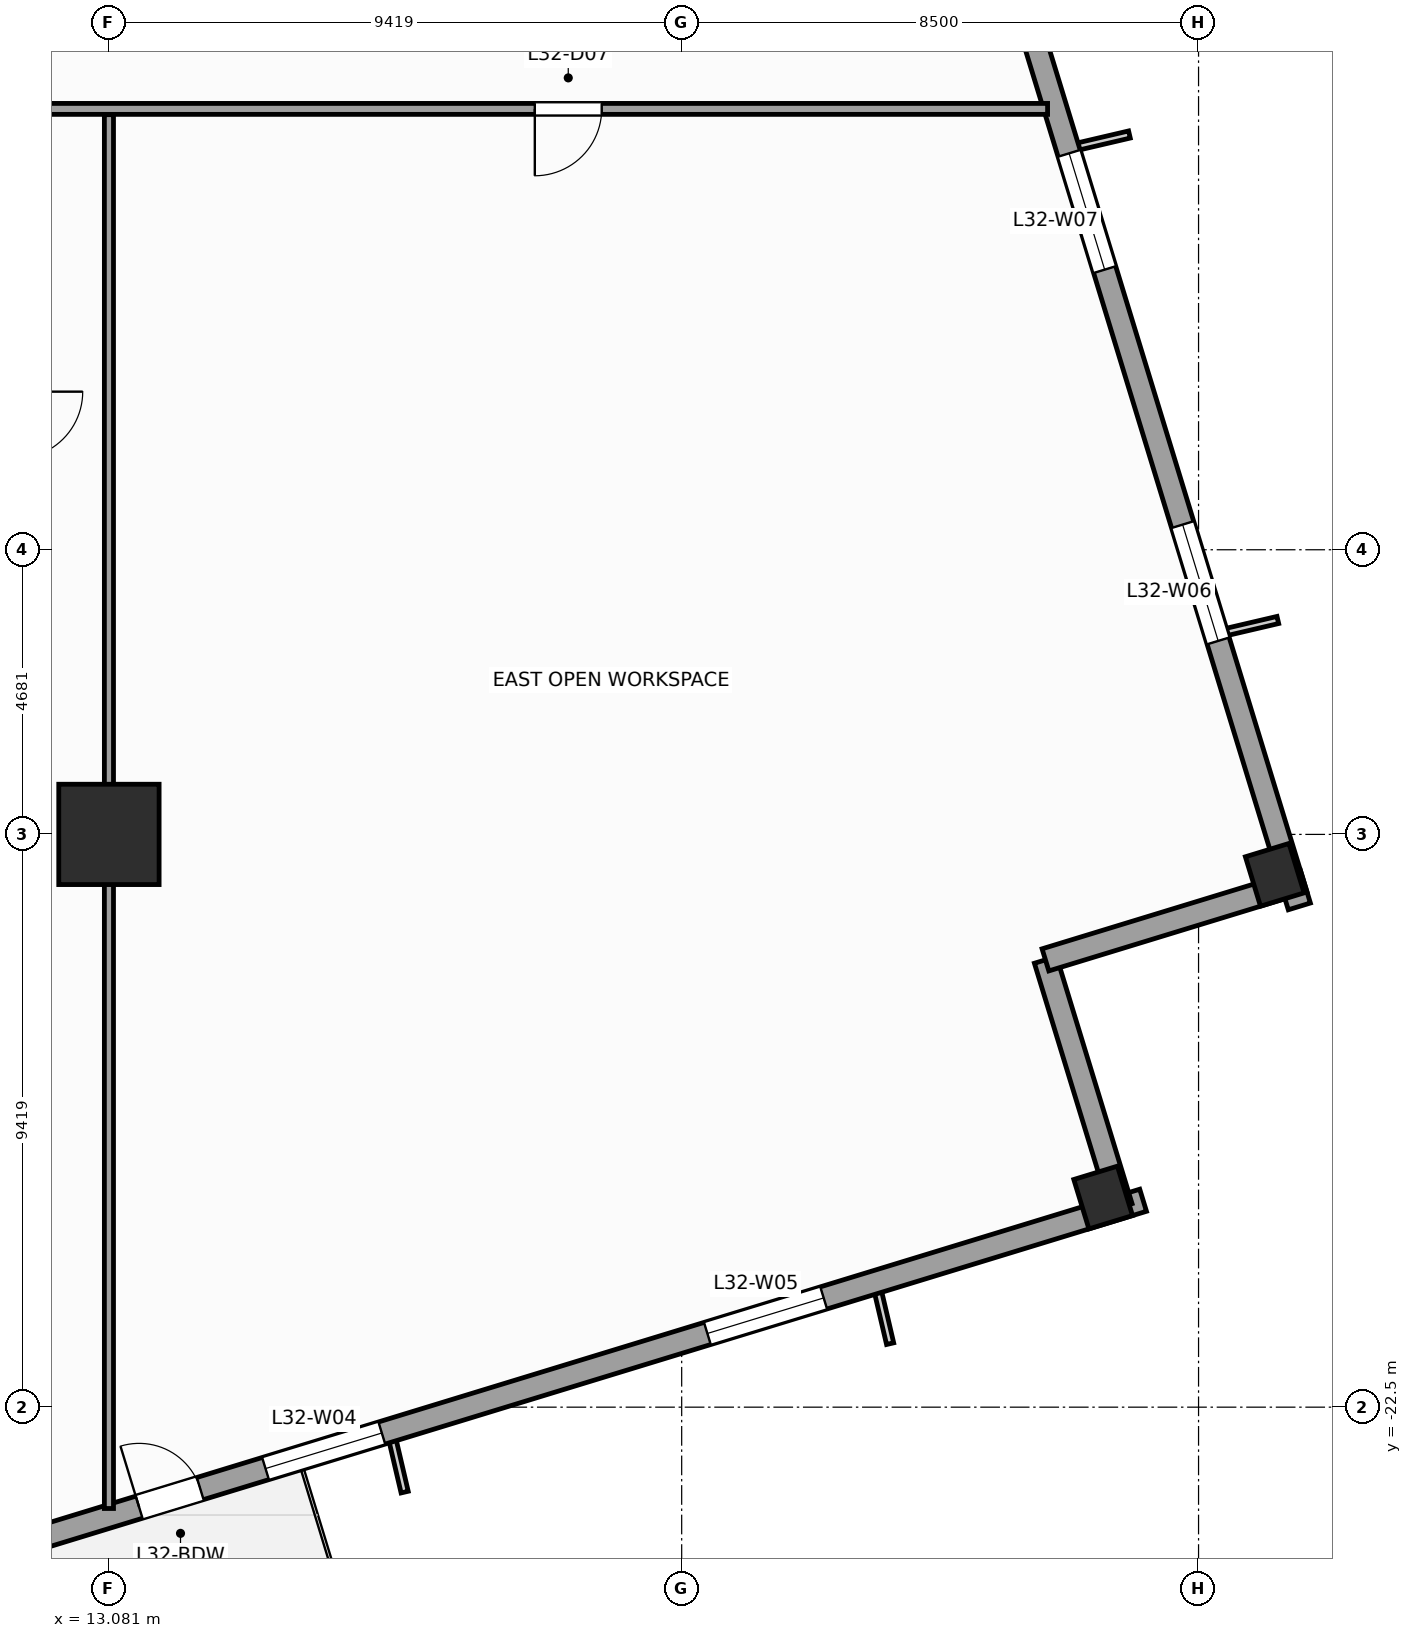
"""IFC4 building model, lengths in metres.
Left out: names, types, materials, properties, quantities, classifications, styles, units other than length and angle.
Written with IfcOpenShell. Run it as: python <this file> out.ifc"""

import sys

from ifc_helpers import new_model, si_unit, direction, frame, frame_2d, origin, origin_2d, place, context, subcontext, project, spatial, rectangle, extrude, source, transform, mapped, element, fill, save


model = new_model("IFC4")
c1 = context("Model", 3, precision=1e-05, world=origin(), true_north=direction((0.0, 1.0)))
c2 = subcontext(c1, "Body", "Model", "MODEL_VIEW")
j1 = project(units=[si_unit("LENGTHUNIT", "METRE"), si_unit("PLANEANGLEUNIT", "RADIAN")], contexts=[c1])
p1 = place(None, origin())
s1 = spatial("IfcSite", under=j1, at=p1, CompositionType="ELEMENT")
p2 = place(p1, origin())
s2 = spatial("IfcBuilding", under=s1, at=p2, CompositionType="ELEMENT")
p3 = place(p2, frame((0.0, 0.0, 135.2)))
s3 = spatial("IfcBuildingStorey", under=s2, at=p3, CompositionType="ELEMENT", Elevation=135.2)
m1 = source(origin(), c2, "Body", "SweptSolid", [
    extrude(rectangle(XDim=1.65, YDim=1.65, at=origin_2d()), origin(), (0.0, 0.0, 1.0), 4.0),
])
p4 = place(p3, frame((13.081, -13.081, 0.0), z_axis=(0.0, 0.0, 1.0), x_axis=(1.0, 0.0, 0.0)))
e1 = element("IfcColumn", 1, at=p4, inside=s3, PredefinedType="COLUMN", context=c2, shape_type="MappedRepresentation", body=[
    mapped(m1, transform((0.0, 0.0, 0.0), scale=1.0)),
])
m2 = source(origin(), c2, "Body", "SweptSolid", [
    extrude(rectangle(XDim=0.75, YDim=0.85, at=origin_2d()), origin(), (0.0, 0.0, 1.0), 4.0),
])
for number, where, z_axis, x_axis in (
    (2, (29.431, -19.052, 0.0), (0.0, 0.0, 1.0), (0.956, 0.292, 0.0)),
    (3, (32.253, -13.746, 0.0), (0.0, 0.0, 1.0), (0.956, 0.292, 0.0)),
):
    element("IfcColumn", number, at=place(p3, frame(where, z_axis=z_axis, x_axis=x_axis)), inside=s3, PredefinedType="COLUMN", context=c2, shape_type="MappedRepresentation", body=[
        mapped(m2, transform((0.0, 0.0, 0.0), scale=1.0)),
    ])
p5 = place(p3, frame((-14.265, -32.658, 0.0), z_axis=(0.0, 0.0, 1.0), x_axis=(0.956304320851, 0.292373127906, 0.0)))
e4 = element("IfcWall", 4, at=p5, inside=s3, PredefinedType="STANDARD", context=c2, shape_type="SweptSolid", body=[
    extrude(rectangle(XDim=46.38, YDim=0.38, at=frame_2d((23.19, 0.0))), origin(), (0.0, 0.0, 1.0), 2.2),
])
p6 = place(p5, frame((29.115, 0.0, 0.0)))
e5 = element("IfcOpeningElement", 5, at=p6, cuts=e4, PredefinedType="OPENING", context=c2, shape_type="SweptSolid", body=[
    extrude(rectangle(XDim=1.05, YDim=2.02, at=frame_2d((0.525, 1.01))), frame((0.0, 0.2, 0.0), z_axis=(0.0, -1.0, 0.0), x_axis=(1.0, 0.0, 0.0)), (0.0, 0.0, 1.0), 0.4),
])
p7 = place(p5, frame((4.566, 0.0, 0.67)))
e6 = element("IfcOpeningElement", 6, at=p7, cuts=e4, PredefinedType="OPENING", context=c2, shape_type="SweptSolid", body=[
    extrude(rectangle(XDim=2.0, YDim=1.45, at=frame_2d((1.0, 0.725))), frame((0.0, 0.2, 0.0), z_axis=(0.0, -1.0, 0.0), x_axis=(1.0, 0.0, 0.0)), (0.0, 0.0, 1.0), 0.4),
])
p8 = place(p5, frame((12.45, 0.0, 0.67)))
e7 = element("IfcOpeningElement", 7, at=p8, cuts=e4, PredefinedType="OPENING", context=c2, shape_type="SweptSolid", body=[
    extrude(rectangle(XDim=2.0, YDim=1.45, at=frame_2d((1.0, 0.725))), frame((0.0, 0.2, 0.0), z_axis=(0.0, -1.0, 0.0), x_axis=(1.0, 0.0, 0.0)), (0.0, 0.0, 1.0), 0.4),
])
p9 = place(p5, frame((19.762, 0.0, 0.67)))
e8 = element("IfcOpeningElement", 8, at=p9, cuts=e4, PredefinedType="OPENING", context=c2, shape_type="SweptSolid", body=[
    extrude(rectangle(XDim=2.0, YDim=1.45, at=frame_2d((1.0, 0.725))), frame((0.0, 0.2, 0.0), z_axis=(0.0, -1.0, 0.0), x_axis=(1.0, 0.0, 0.0)), (0.0, 0.0, 1.0), 0.4),
])
p10 = place(p5, frame((31.288, 0.0, 0.67)))
e9 = element("IfcOpeningElement", 9, at=p10, cuts=e4, PredefinedType="OPENING", context=c2, shape_type="SweptSolid", body=[
    extrude(rectangle(XDim=2.0, YDim=1.45, at=frame_2d((1.0, 0.725))), frame((0.0, 0.2, 0.0), z_axis=(0.0, -1.0, 0.0), x_axis=(1.0, 0.0, 0.0)), (0.0, 0.0, 1.0), 0.4),
])
p11 = place(p5, frame((38.887, 0.0, 0.67)))
e10 = element("IfcOpeningElement", 10, at=p11, cuts=e4, PredefinedType="OPENING", context=c2, shape_type="SweptSolid", body=[
    extrude(rectangle(XDim=2.0, YDim=1.45, at=frame_2d((1.0, 0.725))), frame((0.0, 0.2, 0.0), z_axis=(0.0, -1.0, 0.0), x_axis=(1.0, 0.0, 0.0)), (0.0, 0.0, 1.0), 0.4),
])
p12 = place(p3, frame((29.725, -19.208, 0.0), z_axis=(0.0, 0.0, 1.0), x_axis=(-0.292345507338, 0.956312764915, 0.0)))
e11 = element("IfcWall", 11, at=p12, inside=s3, PredefinedType="STANDARD", context=c2, shape_type="SweptSolid", body=[
    extrude(rectangle(XDim=4.25, YDim=0.38, at=frame_2d((2.125, 0.0))), origin(), (0.0, 0.0, 1.0), 3.6),
])
p13 = place(p3, frame((28.482, -15.144, 0.0), z_axis=(0.0, 0.0, 1.0), x_axis=(0.956304176051, 0.292373601522, 0.0)))
e12 = element("IfcWall", 12, at=p13, inside=s3, PredefinedType="STANDARD", context=c2, shape_type="SweptSolid", body=[
    extrude(rectangle(XDim=4.44, YDim=0.38, at=frame_2d((2.22, 0.0))), origin(), (0.0, 0.0, 1.0), 2.2),
])
p14 = place(p3, frame((32.658, -14.265, 0.0), z_axis=(0.0, 0.0, 1.0), x_axis=(-0.292373127906, 0.956304320851, 0.0)))
e13 = element("IfcWall", 13, at=p14, inside=s3, PredefinedType="STANDARD", context=c2, shape_type="SweptSolid", body=[
    extrude(rectangle(XDim=46.38, YDim=0.38, at=frame_2d((23.19, 0.0))), origin(), (0.0, 0.0, 1.0), 2.2),
])
p15 = place(p14, frame((4.566, 0.0, 0.67)))
e14 = element("IfcOpeningElement", 14, at=p15, cuts=e13, PredefinedType="OPENING", context=c2, shape_type="SweptSolid", body=[
    extrude(rectangle(XDim=2.0, YDim=1.45, at=frame_2d((1.0, 0.725))), frame((0.0, 0.2, 0.0), z_axis=(0.0, -1.0, 0.0), x_axis=(1.0, 0.0, 0.0)), (0.0, 0.0, 1.0), 0.4),
])
p16 = place(p14, frame((10.95, 0.0, 0.67)))
e15 = element("IfcOpeningElement", 15, at=p16, cuts=e13, PredefinedType="OPENING", context=c2, shape_type="SweptSolid", body=[
    extrude(rectangle(XDim=2.0, YDim=1.45, at=frame_2d((1.0, 0.725))), frame((0.0, 0.2, 0.0), z_axis=(0.0, -1.0, 0.0), x_axis=(1.0, 0.0, 0.0)), (0.0, 0.0, 1.0), 0.4),
])
p17 = place(p14, frame((20.512, 0.0, 0.67)))
e16 = element("IfcOpeningElement", 16, at=p17, cuts=e13, PredefinedType="OPENING", context=c2, shape_type="SweptSolid", body=[
    extrude(rectangle(XDim=2.0, YDim=1.45, at=frame_2d((1.0, 0.725))), frame((0.0, 0.2, 0.0), z_axis=(0.0, -1.0, 0.0), x_axis=(1.0, 0.0, 0.0)), (0.0, 0.0, 1.0), 0.4),
])
p18 = place(p14, frame((30.538, 0.0, 0.67)))
e17 = element("IfcOpeningElement", 17, at=p18, cuts=e13, PredefinedType="OPENING", context=c2, shape_type="SweptSolid", body=[
    extrude(rectangle(XDim=2.0, YDim=1.45, at=frame_2d((1.0, 0.725))), frame((0.0, 0.2, 0.0), z_axis=(0.0, -1.0, 0.0), x_axis=(1.0, 0.0, 0.0)), (0.0, 0.0, 1.0), 0.4),
])
p19 = place(p14, frame((38.887, 0.0, 0.67)))
e18 = element("IfcOpeningElement", 18, at=p19, cuts=e13, PredefinedType="OPENING", context=c2, shape_type="SweptSolid", body=[
    extrude(rectangle(XDim=2.0, YDim=1.45, at=frame_2d((1.0, 0.725))), frame((0.0, 0.2, 0.0), z_axis=(0.0, -1.0, 0.0), x_axis=(1.0, 0.0, 0.0)), (0.0, 0.0, 1.0), 0.4),
])
p20 = place(p3, frame((11.65, -1.15, 0.0), z_axis=(0.0, 0.0, 1.0), x_axis=(1.0, 0.0, 0.0)))
e19 = element("IfcWall", 19, at=p20, inside=s3, PredefinedType="PARTITIONING", context=c2, shape_type="SweptSolid", body=[
    extrude(rectangle(XDim=16.867, YDim=0.18, at=frame_2d((8.434, 0.0))), origin(), (0.0, 0.0, 1.0), 3.6),
])
p21 = place(p20, frame((8.435, 0.0, 0.0)))
e20 = element("IfcOpeningElement", 20, at=p21, cuts=e19, PredefinedType="OPENING", context=c2, shape_type="SweptSolid", body=[
    extrude(rectangle(XDim=1.1, YDim=2.2, at=frame_2d((0.55, 1.1))), frame((0.0, 0.1, 0.0), z_axis=(0.0, -1.0, 0.0), x_axis=(1.0, 0.0, 0.0)), (0.0, 0.0, 1.0), 0.2),
])
p22 = place(p3, frame((13.081, -24.167, 0.0), z_axis=(0.0, 0.0, 1.0), x_axis=(0.0, 1.0, 0.0)))
e21 = element("IfcWall", 21, at=p22, inside=s3, PredefinedType="PARTITIONING", context=c2, shape_type="SweptSolid", body=[
    extrude(rectangle(XDim=22.921, YDim=0.15, at=frame_2d((11.461, 0.0))), origin(), (0.0, 0.0, 1.0), 2.2),
])
m3 = source(origin(), c2, "Body", "SweptSolid", [
    extrude(rectangle(XDim=1.05, YDim=2.02, at=frame_2d((0.525, 1.01))), frame((0.0, 0.025, 0.0), z_axis=(0.0, -1.0, 0.0), x_axis=(1.0, 0.0, 0.0)), (0.0, 0.0, 1.0), 0.05),
])
p23 = place(p6, origin())
e22 = element("IfcDoor", 22, at=p23, inside=s3, OperationType="SINGLE_SWING_LEFT", PredefinedType="DOOR", context=c2, shape_type="MappedRepresentation", body=[
    mapped(m3, transform((0.0, 0.0, 0.0), scale=1.0)),
])
fill(e5, e22)
m4 = source(origin(), c2, "Body", "SweptSolid", [
    extrude(rectangle(XDim=2.0, YDim=1.45, at=frame_2d((1.0, 0.725))), frame((0.0, 0.03, 0.0), z_axis=(0.0, -1.0, 0.0), x_axis=(1.0, 0.0, 0.0)), (0.0, 0.0, 1.0), 0.06),
])
p24 = place(p10, origin())
e23 = element("IfcWindow", 23, at=p24, inside=s3, PartitioningType="SINGLE_PANEL", PredefinedType="WINDOW", context=c2, shape_type="MappedRepresentation", body=[
    mapped(m4, transform((0.0, 0.0, 0.0), scale=1.0)),
])
fill(e9, e23)
p25 = place(p11, origin())
e24 = element("IfcWindow", 24, at=p25, inside=s3, PartitioningType="SINGLE_PANEL", PredefinedType="WINDOW", context=c2, shape_type="MappedRepresentation", body=[
    mapped(m4, transform((0.0, 0.0, 0.0), scale=1.0)),
])
fill(e10, e24)
p26 = place(p15, origin())
e25 = element("IfcWindow", 25, at=p26, inside=s3, PartitioningType="SINGLE_PANEL", PredefinedType="WINDOW", context=c2, shape_type="MappedRepresentation", body=[
    mapped(m4, transform((0.0, 0.0, 0.0), scale=1.0)),
])
fill(e14, e25)
p27 = place(p16, origin())
e26 = element("IfcWindow", 26, at=p27, inside=s3, PartitioningType="SINGLE_PANEL", PredefinedType="WINDOW", context=c2, shape_type="MappedRepresentation", body=[
    mapped(m4, transform((0.0, 0.0, 0.0), scale=1.0)),
])
fill(e15, e26)
m5 = source(origin(), c2, "Body", "SweptSolid", [
    extrude(rectangle(XDim=1.1, YDim=2.2, at=frame_2d((0.55, 1.1))), frame((0.0, 0.025, 0.0), z_axis=(0.0, -1.0, 0.0), x_axis=(1.0, 0.0, 0.0)), (0.0, 0.0, 1.0), 0.05),
])
p28 = place(p21, frame((1.1, 0.0, 0.0), z_axis=(0.0, 0.0, 1.0), x_axis=(-1.0, 0.0, 0.0)))
e27 = element("IfcDoor", 27, at=p28, inside=s3, OperationType="SINGLE_SWING_LEFT", PredefinedType="DOOR", context=c2, shape_type="MappedRepresentation", body=[
    mapped(m5, transform((0.0, 0.0, 0.0), scale=1.0)),
])
fill(e20, e27)
save(model, sys.argv[1])
